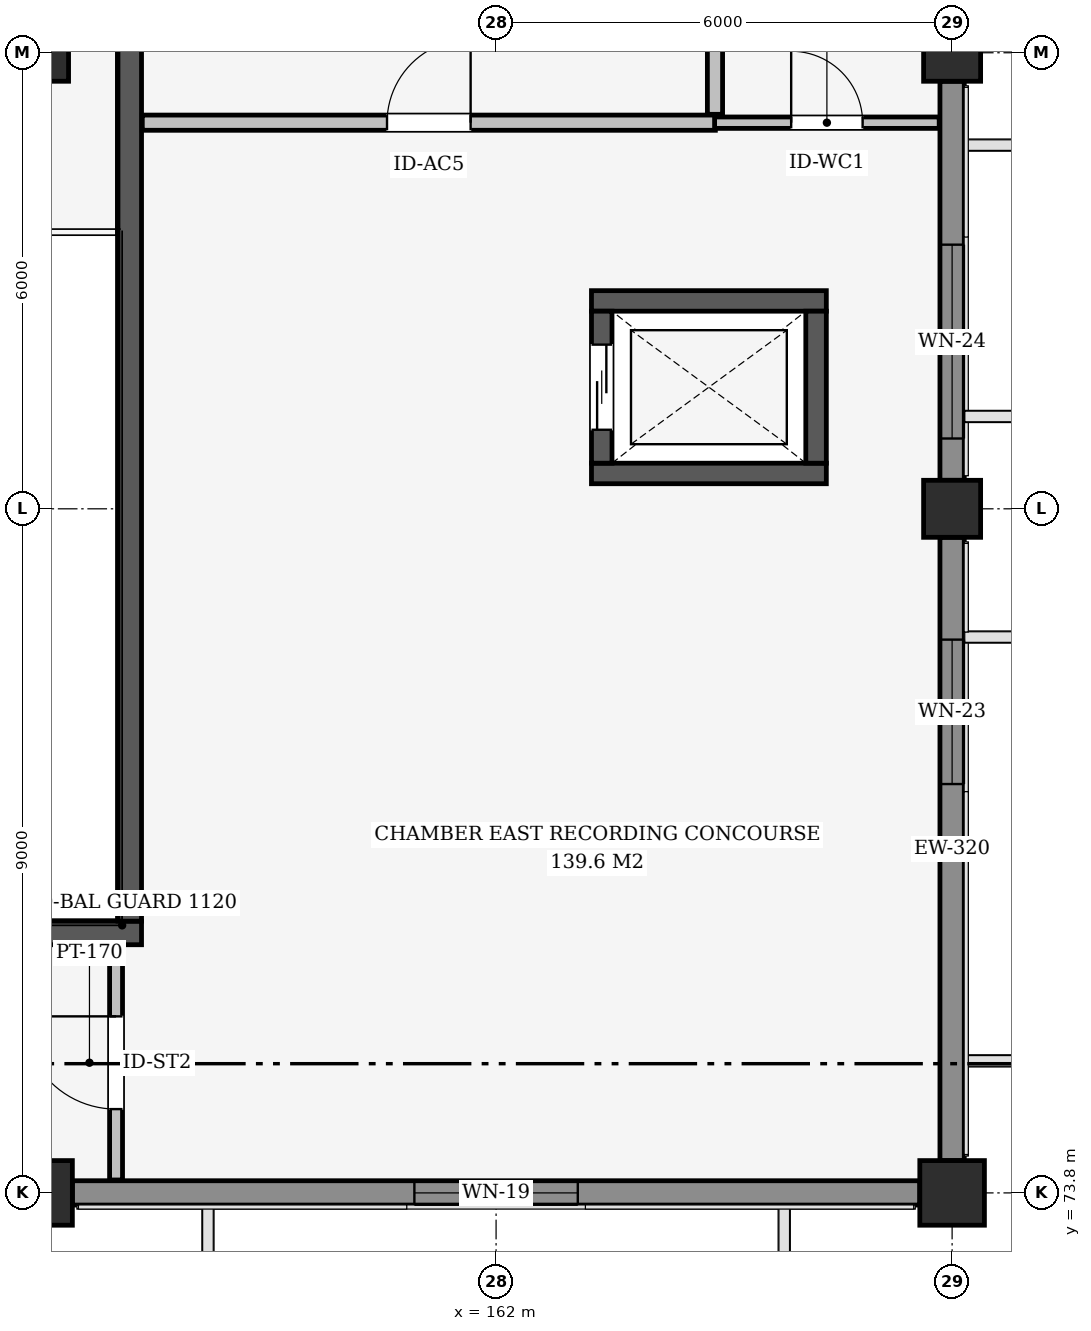
"""IFC4 building model, lengths in metres.
Left out: names, types, materials, properties, quantities, classifications, styles, units other than length and angle.
Written with IfcOpenShell. Run it as: python <this file> out.ifc"""

import sys

from ifc_helpers import new_model, si_unit, direction, frame, frame_2d, origin, origin_2d, place, context, subcontext, project, spatial, rectangle, extrude, element, fill, save


model = new_model("IFC4")
c1 = context("Model", 3, precision=1e-05, world=origin(), true_north=direction((0.0, 1.0)))
c2 = subcontext(c1, "Body", "Model", "MODEL_VIEW")
j1 = project(units=[si_unit("LENGTHUNIT", "METRE"), si_unit("PLANEANGLEUNIT", "RADIAN")], contexts=[c1])
p1 = place(None, origin())
s1 = spatial("IfcSite", under=j1, at=p1, CompositionType="ELEMENT")
p2 = place(p1, origin())
s2 = spatial("IfcBuilding", under=s1, at=p2, CompositionType="ELEMENT")
p3 = place(p2, frame((0.0, 0.0, 4.8)))
s3 = spatial("IfcBuildingStorey", under=s2, at=p3, CompositionType="ELEMENT", Elevation=4.8)
p4 = place(p3, frame((156.0, 73.8, 0.0), z_axis=(0.0, 0.0, 1.0), x_axis=(1.0, 0.0, 0.0)))
e1 = element("IfcColumn", 1, at=p4, inside=s3, PredefinedType="COLUMN", context=c2, shape_type="SweptSolid", body=[
    extrude(rectangle(XDim=0.85, YDim=0.85, at=origin_2d()), origin(), (0.0, 0.0, 1.0), 4.5),
])
p5 = place(p3, frame((156.0, 88.8, 0.0), z_axis=(0.0, 0.0, 1.0), x_axis=(1.0, 0.0, 0.0)))
e2 = element("IfcColumn", 2, at=p5, inside=s3, PredefinedType="COLUMN", context=c2, shape_type="SweptSolid", body=[
    extrude(rectangle(XDim=0.75, YDim=0.75, at=origin_2d()), origin(), (0.0, 0.0, 1.0), 4.5),
])
p6 = place(p3, frame((168.0, 73.8, 0.0), z_axis=(0.0, 0.0, 1.0), x_axis=(1.0, 0.0, 0.0)))
e3 = element("IfcColumn", 3, at=p6, inside=s3, PredefinedType="COLUMN", context=c2, shape_type="SweptSolid", body=[
    extrude(rectangle(XDim=0.85, YDim=0.85, at=origin_2d()), origin(), (0.0, 0.0, 1.0), 4.5),
])
for number, where, z_axis, x_axis in (
    (4, (168.0, 82.8, 0.0), (0.0, 0.0, 1.0), (1.0, 0.0, 0.0)),
    (5, (168.0, 88.8, 0.0), (0.0, 0.0, 1.0), (1.0, 0.0, 0.0)),
):
    element("IfcColumn", number, at=place(p3, frame(where, z_axis=z_axis, x_axis=x_axis)), inside=s3, PredefinedType="COLUMN", context=c2, shape_type="SweptSolid", body=[
        extrude(rectangle(XDim=0.75, YDim=0.75, at=origin_2d()), origin(), (0.0, 0.0, 1.0), 4.5),
    ])
p7 = place(p3, frame((144.665, 77.22, 0.0), z_axis=(0.0, 0.0, 1.0), x_axis=(1.0, 0.0, 0.0)))
e6 = element("IfcWall", 6, at=p7, inside=s3, PredefinedType="SHEAR", context=c2, shape_type="SweptSolid", body=[
    extrude(rectangle(XDim=12.67, YDim=0.31, at=frame_2d((6.335, 0.0))), origin(), (0.0, 0.0, 1.0), 4.24),
])
p8 = place(p3, frame((157.18, 77.375, 0.0), z_axis=(0.0, 0.0, 1.0), x_axis=(0.0, 1.0, 0.0)))
e7 = element("IfcWall", 7, at=p8, inside=s3, PredefinedType="SHEAR", context=c2, shape_type="SweptSolid", body=[
    extrude(rectangle(XDim=15.89, YDim=0.31, at=frame_2d((7.945, 0.0))), origin(), (0.0, 0.0, 1.0), 4.24),
])
p9 = place(p3, frame((167.575, 73.8, 0.0), z_axis=(0.0, 0.0, 1.0), x_axis=(-1.0, 0.0, 0.0)))
e8 = element("IfcWall", 8, at=p9, inside=s3, PredefinedType="SOLIDWALL", context=c2, shape_type="SweptSolid", body=[
    extrude(rectangle(XDim=11.15, YDim=0.32, at=frame_2d((5.575, 0.0))), origin(), (0.0, 0.0, 1.0), 3.684),
])
p10 = place(p9, frame((4.5, 0.0, 0.85)))
e9 = element("IfcOpeningElement", 9, at=p10, cuts=e8, PredefinedType="OPENING", context=c2, shape_type="SweptSolid", body=[
    extrude(rectangle(XDim=2.15, YDim=1.55, at=frame_2d((1.075, 0.775))), frame((0.0, 0.17, 0.0), z_axis=(0.0, -1.0, 0.0), x_axis=(1.0, 0.0, 0.0)), (0.0, 0.0, 1.0), 0.34),
])
p11 = place(p3, frame((168.0, 82.425, 0.0), z_axis=(0.0, 0.0, 1.0), x_axis=(0.0, -1.0, 0.0)))
e10 = element("IfcWall", 10, at=p11, inside=s3, PredefinedType="SOLIDWALL", context=c2, shape_type="SweptSolid", body=[
    extrude(rectangle(XDim=8.2, YDim=0.32, at=frame_2d((4.1, 0.0))), origin(), (0.0, 0.0, 1.0), 3.609),
])
p12 = place(p11, frame((1.346, 0.0, 0.85)))
e11 = element("IfcOpeningElement", 11, at=p12, cuts=e10, PredefinedType="OPENING", context=c2, shape_type="SweptSolid", body=[
    extrude(rectangle(XDim=1.9, YDim=1.6, at=frame_2d((0.95, 0.8))), frame((0.0, 0.17, 0.0), z_axis=(0.0, -1.0, 0.0), x_axis=(1.0, 0.0, 0.0)), (0.0, 0.0, 1.0), 0.34),
])
p13 = place(p3, frame((168.0, 88.425, 0.0), z_axis=(0.0, 0.0, 1.0), x_axis=(0.0, -1.0, 0.0)))
e12 = element("IfcWall", 12, at=p13, inside=s3, PredefinedType="SOLIDWALL", context=c2, shape_type="SweptSolid", body=[
    extrude(rectangle(XDim=5.25, YDim=0.32, at=frame_2d((2.625, 0.0))), origin(), (0.0, 0.0, 1.0), 3.608),
])
p14 = place(p13, frame((2.15, 0.0, 0.85)))
e13 = element("IfcOpeningElement", 13, at=p14, cuts=e12, PredefinedType="OPENING", context=c2, shape_type="SweptSolid", body=[
    extrude(rectangle(XDim=2.55, YDim=1.05, at=frame_2d((1.275, 0.525))), frame((0.0, 0.17, 0.0), z_axis=(0.0, -1.0, 0.0), x_axis=(1.0, 0.0, 0.0)), (0.0, 0.0, 1.0), 0.34),
])
for number, where, z_axis, x_axis in (
    (14, (163.255, 83.265, 0.0), (0.0, 0.0, 1.0), (1.0, 0.0, 0.0)),
    (15, (163.255, 85.535, 0.0), (0.0, 0.0, 1.0), (1.0, 0.0, 0.0)),
):
    element("IfcWall", number, at=place(p3, frame(where, z_axis=z_axis, x_axis=x_axis)), inside=s3, PredefinedType="SHEAR", context=c2, shape_type="SweptSolid", body=[
        extrude(rectangle(XDim=3.09, YDim=0.27, at=frame_2d((1.545, 0.0))), origin(), (0.0, 0.0, 1.0), 4.24),
    ])
p15 = place(p3, frame((163.39, 83.4, 0.0), z_axis=(0.0, 0.0, 1.0), x_axis=(0.0, 1.0, 0.0)))
e16 = element("IfcWall", 16, at=p15, inside=s3, PredefinedType="SHEAR", context=c2, shape_type="SweptSolid", body=[
    extrude(rectangle(XDim=2.0, YDim=0.27, at=frame_2d((1.0, 0.0))), origin(), (0.0, 0.0, 1.0), 4.24),
])
p16 = place(p15, frame((0.44, 0.0, 0.0)))
e17 = element("IfcOpeningElement", 17, at=p16, cuts=e16, PredefinedType="OPENING", context=c2, shape_type="SweptSolid", body=[
    extrude(rectangle(XDim=1.12, YDim=2.15, at=frame_2d((0.56, 1.075))), frame((0.0, 0.145, 0.0), z_axis=(0.0, -1.0, 0.0), x_axis=(1.0, 0.0, 0.0)), (0.0, 0.0, 1.0), 0.29),
])
p17 = place(p3, frame((166.21, 83.4, 0.0), z_axis=(0.0, 0.0, 1.0), x_axis=(0.0, 1.0, 0.0)))
e18 = element("IfcWall", 18, at=p17, inside=s3, PredefinedType="SHEAR", context=c2, shape_type="SweptSolid", body=[
    extrude(rectangle(XDim=2.0, YDim=0.27, at=frame_2d((1.0, 0.0))), origin(), (0.0, 0.0, 1.0), 4.24),
])
p18 = place(p3, frame((157.0, 73.97, 0.0), z_axis=(0.0, 0.0, 1.0), x_axis=(0.0, 1.0, 0.0)))
e19 = element("IfcWall", 19, at=p18, inside=s3, PredefinedType="PARTITIONING", context=c2, shape_type="SweptSolid", body=[
    extrude(rectangle(XDim=3.085, YDim=0.17, at=frame_2d((1.542, 0.0))), origin(), (0.0, 0.0, 1.0), 3.684),
])
p19 = place(p18, frame((0.933, 0.0, 0.0)))
e20 = element("IfcOpeningElement", 20, at=p19, cuts=e19, PredefinedType="OPENING", context=c2, shape_type="SweptSolid", body=[
    extrude(rectangle(XDim=1.22, YDim=2.18, at=frame_2d((0.61, 1.09))), frame((0.0, 0.095, 0.0), z_axis=(0.0, -1.0, 0.0), x_axis=(1.0, 0.0, 0.0)), (0.0, 0.0, 1.0), 0.19),
])
p20 = place(p3, frame((157.345, 87.88, 0.0), z_axis=(0.0, 0.0, 1.0), x_axis=(1.0, 0.0, 0.0)))
e21 = element("IfcWall", 21, at=p20, inside=s3, PredefinedType="PARTITIONING", context=c2, shape_type="SweptSolid", body=[
    extrude(rectangle(XDim=7.54, YDim=0.2, at=frame_2d((3.77, 0.0))), origin(), (0.0, 0.0, 1.0), 4.22),
])
p21 = place(p20, frame((3.22, 0.0, 0.0)))
e22 = element("IfcOpeningElement", 22, at=p21, cuts=e21, PredefinedType="OPENING", context=c2, shape_type="SweptSolid", body=[
    extrude(rectangle(XDim=1.1, YDim=2.26, at=frame_2d((0.55, 1.13))), frame((0.0, 0.11, 0.0), z_axis=(0.0, -1.0, 0.0), x_axis=(1.0, 0.0, 0.0)), (0.0, 0.0, 1.0), 0.22),
])
p22 = place(p3, frame((164.875, 87.88, 0.0), z_axis=(0.0, 0.0, 1.0), x_axis=(1.0, 0.0, 0.0)))
e23 = element("IfcWall", 23, at=p22, inside=s3, PredefinedType="PARTITIONING", context=c2, shape_type="SweptSolid", body=[
    extrude(rectangle(XDim=2.955, YDim=0.15, at=frame_2d((1.478, 0.0))), origin(), (0.0, 0.0, 1.0), 4.22),
])
p23 = place(p22, frame((1.008, 0.0, 0.0)))
e24 = element("IfcOpeningElement", 24, at=p23, cuts=e23, PredefinedType="OPENING", context=c2, shape_type="SweptSolid", body=[
    extrude(rectangle(XDim=0.94, YDim=2.1, at=frame_2d((0.47, 1.05))), frame((0.0, 0.085, 0.0), z_axis=(0.0, -1.0, 0.0), x_axis=(1.0, 0.0, 0.0)), (0.0, 0.0, 1.0), 0.17),
])
p24 = place(p3, frame((164.88, 87.99, 0.0), z_axis=(0.0, 0.0, 1.0), x_axis=(0.0, 1.0, 0.0)))
e25 = element("IfcWall", 25, at=p24, inside=s3, PredefinedType="PARTITIONING", context=c2, shape_type="SweptSolid", body=[
    extrude(rectangle(XDim=9.04, YDim=0.2, at=frame_2d((4.52, 0.0))), origin(), (0.0, 0.0, 1.0), 3.763),
])
p25 = place(p10, origin())
e26 = element("IfcWindow", 26, at=p25, inside=s3, PartitioningType="SINGLE_PANEL", PredefinedType="WINDOW", context=c2, shape_type="SweptSolid", body=[
    extrude(rectangle(XDim=2.15, YDim=1.55, at=frame_2d((1.075, 0.775))), frame((0.0, 0.03, 0.0), z_axis=(0.0, -1.0, 0.0), x_axis=(1.0, 0.0, 0.0)), (0.0, 0.0, 1.0), 0.06),
])
fill(e9, e26)
p26 = place(p12, origin())
e27 = element("IfcWindow", 27, at=p26, inside=s3, PartitioningType="SINGLE_PANEL", PredefinedType="WINDOW", context=c2, shape_type="SweptSolid", body=[
    extrude(rectangle(XDim=1.9, YDim=1.6, at=frame_2d((0.95, 0.8))), frame((0.0, 0.03, 0.0), z_axis=(0.0, -1.0, 0.0), x_axis=(1.0, 0.0, 0.0)), (0.0, 0.0, 1.0), 0.06),
])
fill(e11, e27)
p27 = place(p14, origin())
e28 = element("IfcWindow", 28, at=p27, inside=s3, PartitioningType="SINGLE_PANEL", PredefinedType="WINDOW", context=c2, shape_type="SweptSolid", body=[
    extrude(rectangle(XDim=2.55, YDim=1.05, at=frame_2d((1.275, 0.525))), frame((0.0, 0.03, 0.0), z_axis=(0.0, -1.0, 0.0), x_axis=(1.0, 0.0, 0.0)), (0.0, 0.0, 1.0), 0.06),
])
fill(e13, e28)
p28 = place(p16, origin())
e29 = element("IfcDoor", 29, at=p28, inside=s3, OperationType="SLIDING_TO_LEFT", PredefinedType="DOOR", context=c2, shape_type="SweptSolid", body=[
    extrude(rectangle(XDim=1.12, YDim=2.15, at=frame_2d((0.56, 1.075))), frame((0.0, 0.025, 0.0), z_axis=(0.0, -1.0, 0.0), x_axis=(1.0, 0.0, 0.0)), (0.0, 0.0, 1.0), 0.05),
])
fill(e17, e29)
p29 = place(p19, origin())
e30 = element("IfcDoor", 30, at=p29, inside=s3, OperationType="SINGLE_SWING_RIGHT", PredefinedType="DOOR", context=c2, shape_type="SweptSolid", body=[
    extrude(rectangle(XDim=1.22, YDim=2.18, at=frame_2d((0.61, 1.09))), frame((0.0, 0.025, 0.0), z_axis=(0.0, -1.0, 0.0), x_axis=(1.0, 0.0, 0.0)), (0.0, 0.0, 1.0), 0.05),
])
fill(e20, e30)
p30 = place(p21, origin())
e31 = element("IfcDoor", 31, at=p30, inside=s3, OperationType="SINGLE_SWING_RIGHT", PredefinedType="DOOR", context=c2, shape_type="SweptSolid", body=[
    extrude(rectangle(XDim=1.1, YDim=2.26, at=frame_2d((0.55, 1.13))), frame((0.0, 0.025, 0.0), z_axis=(0.0, -1.0, 0.0), x_axis=(1.0, 0.0, 0.0)), (0.0, 0.0, 1.0), 0.05),
])
fill(e22, e31)
p31 = place(p23, origin())
e32 = element("IfcDoor", 32, at=p31, inside=s3, OperationType="SINGLE_SWING_LEFT", PredefinedType="DOOR", context=c2, shape_type="SweptSolid", body=[
    extrude(rectangle(XDim=0.94, YDim=2.1, at=frame_2d((0.47, 1.05))), frame((0.0, 0.025, 0.0), z_axis=(0.0, -1.0, 0.0), x_axis=(1.0, 0.0, 0.0)), (0.0, 0.0, 1.0), 0.05),
])
fill(e24, e32)
save(model, sys.argv[1])
